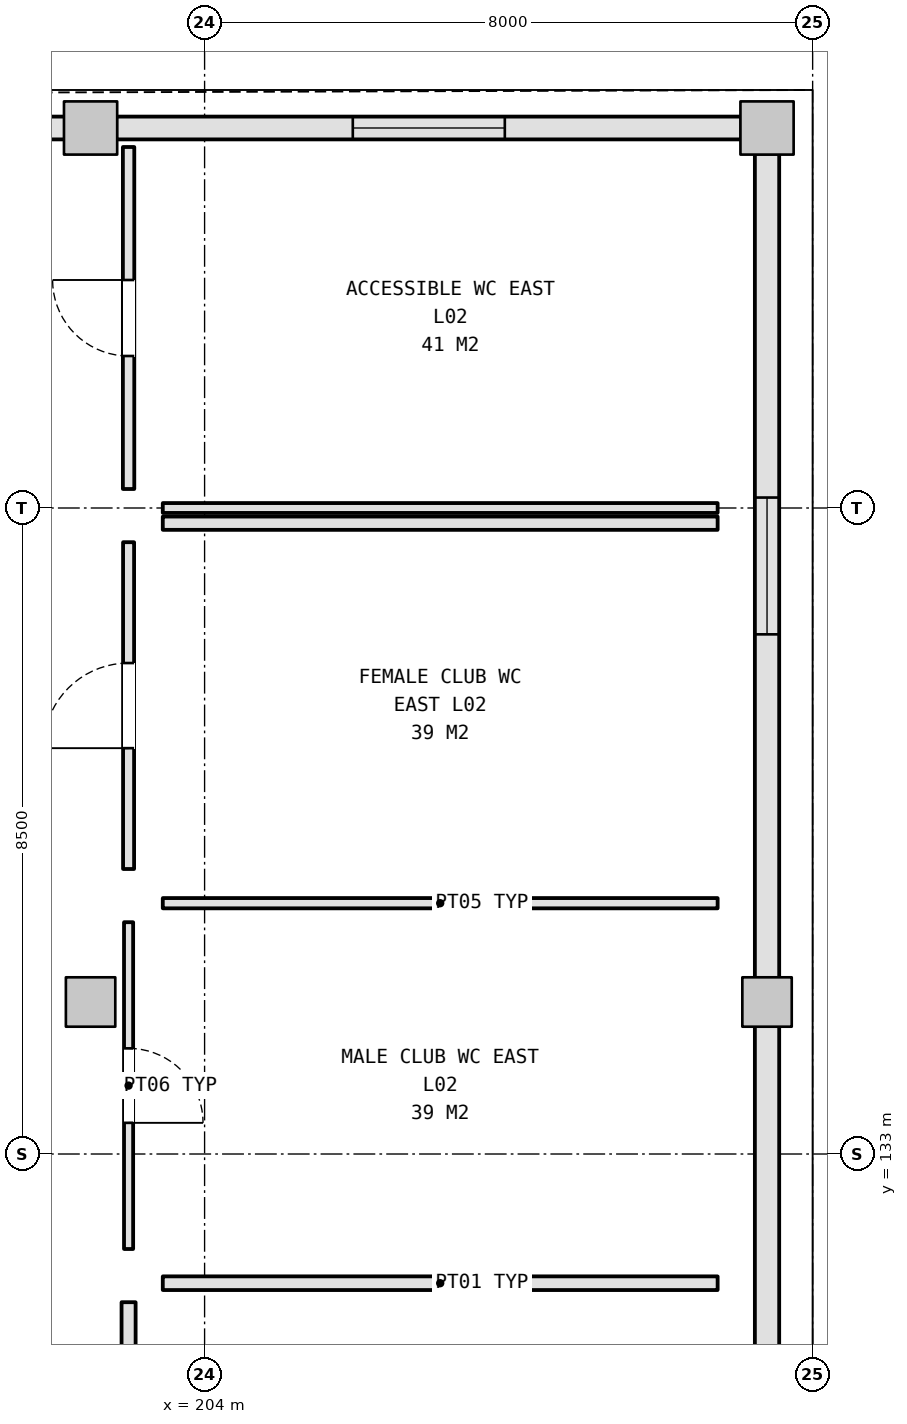
"""IFC4 building model, lengths in metres.
Left out: names, types, materials, properties, quantities, classifications, styles, units other than length and angle.
Written with IfcOpenShell. Run it as: python <this file> out.ifc"""

import sys

from ifc_helpers import new_model, si_unit, direction, frame, frame_2d, origin, origin_2d, place, context, subcontext, project, spatial, rectangle, extrude, element, fill, save


model = new_model("IFC4")
c1 = context("Model", 3, precision=1e-05, world=origin(), true_north=direction((0.0, 1.0)))
c2 = subcontext(c1, "Body", "Model", "MODEL_VIEW")
j1 = project(units=[si_unit("LENGTHUNIT", "METRE"), si_unit("PLANEANGLEUNIT", "RADIAN")], contexts=[c1])
p1 = place(None, origin())
s1 = spatial("IfcSite", under=j1, at=p1, CompositionType="ELEMENT")
p2 = place(p1, origin())
s2 = spatial("IfcBuilding", under=s1, at=p2, CompositionType="ELEMENT")
p3 = place(p2, frame((0.0, 0.0, 10.8)))
s3 = spatial("IfcBuildingStorey", under=s2, at=p3, CompositionType="ELEMENT", Elevation=10.8)
p4 = place(p3, frame((202.5, 135.0, 0.0), z_axis=(0.0, 0.0, 1.0), x_axis=(1.0, 0.0, 0.0)))
e1 = element("IfcColumn", 1, at=p4, inside=s3, PredefinedType="COLUMN", context=c2, shape_type="SweptSolid", body=[
    extrude(rectangle(XDim=0.65, YDim=0.65, at=origin_2d()), origin(), (0.0, 0.0, 1.0), 5.4),
])
p5 = place(p3, frame((202.5, 146.5, 0.0), z_axis=(0.0, 0.0, 1.0), x_axis=(1.0, 0.0, 0.0)))
e2 = element("IfcColumn", 2, at=p5, inside=s3, PredefinedType="COLUMN", context=c2, shape_type="SweptSolid", body=[
    extrude(rectangle(XDim=0.7, YDim=0.7, at=origin_2d()), origin(), (0.0, 0.0, 1.0), 5.4),
])
p6 = place(p3, frame((211.4, 135.0, 0.0), z_axis=(0.0, 0.0, 1.0), x_axis=(1.0, 0.0, 0.0)))
e3 = element("IfcColumn", 3, at=p6, inside=s3, PredefinedType="COLUMN", context=c2, shape_type="SweptSolid", body=[
    extrude(rectangle(XDim=0.65, YDim=0.65, at=origin_2d()), origin(), (0.0, 0.0, 1.0), 5.4),
])
p7 = place(p3, frame((211.4, 146.5, 0.0), z_axis=(0.0, 0.0, 1.0), x_axis=(1.0, 0.0, 0.0)))
e4 = element("IfcColumn", 4, at=p7, inside=s3, PredefinedType="COLUMN", context=c2, shape_type="SweptSolid", body=[
    extrude(rectangle(XDim=0.7, YDim=0.7, at=origin_2d()), origin(), (0.0, 0.0, 1.0), 5.4),
])
p8 = place(p3, frame((211.4, 123.838, 0.0), z_axis=(0.0, 0.0, 1.0), x_axis=(0.0, 1.0, 0.0)))
e5 = element("IfcWall", 5, at=p8, inside=s3, PredefinedType="SOLIDWALL", context=c2, shape_type="SweptSolid", body=[
    extrude(rectangle(XDim=10.849, YDim=0.32, at=frame_2d((5.425, 0.0))), origin(), (0.0, 0.0, 1.0), 4.455),
])
p9 = place(p8, frame((4.524, 0.0, 1.2)))
e6 = element("IfcOpeningElement", 6, at=p9, cuts=e5, PredefinedType="OPENING", context=c2, shape_type="SweptSolid", body=[
    extrude(rectangle(XDim=1.8, YDim=1.6, at=frame_2d((0.9, 0.8))), frame((0.0, 0.17, 0.0), z_axis=(0.0, -1.0, 0.0), x_axis=(1.0, 0.0, 0.0)), (0.0, 0.0, 1.0), 0.34),
])
p10 = place(p3, frame((211.4, 135.313, 0.0), z_axis=(0.0, 0.0, 1.0), x_axis=(0.0, 1.0, 0.0)))
e7 = element("IfcWall", 7, at=p10, inside=s3, PredefinedType="SOLIDWALL", context=c2, shape_type="SweptSolid", body=[
    extrude(rectangle(XDim=10.849, YDim=0.32, at=frame_2d((5.425, 0.0))), origin(), (0.0, 0.0, 1.0), 4.455),
])
p11 = place(p10, frame((4.524, 0.0, 1.2)))
e8 = element("IfcOpeningElement", 8, at=p11, cuts=e7, PredefinedType="OPENING", context=c2, shape_type="SweptSolid", body=[
    extrude(rectangle(XDim=1.8, YDim=1.6, at=frame_2d((0.9, 0.8))), frame((0.0, 0.17, 0.0), z_axis=(0.0, -1.0, 0.0), x_axis=(1.0, 0.0, 0.0)), (0.0, 0.0, 1.0), 0.34),
])
p12 = place(p3, frame((193.938, 146.5, 0.0), z_axis=(0.0, 0.0, 1.0), x_axis=(1.0, 0.0, 0.0)))
e9 = element("IfcWall", 9, at=p12, inside=s3, PredefinedType="SOLIDWALL", context=c2, shape_type="SweptSolid", body=[
    extrude(rectangle(XDim=8.224, YDim=0.3, at=frame_2d((4.112, 0.0))), origin(), (0.0, 0.0, 1.0), 4.455),
])
p13 = place(p12, frame((3.112, 0.0, 1.05)))
e10 = element("IfcOpeningElement", 10, at=p13, cuts=e9, PredefinedType="OPENING", context=c2, shape_type="SweptSolid", body=[
    extrude(rectangle(XDim=2.0, YDim=1.7, at=frame_2d((1.0, 0.85))), frame((0.0, 0.16, 0.0), z_axis=(0.0, -1.0, 0.0), x_axis=(1.0, 0.0, 0.0)), (0.0, 0.0, 1.0), 0.32),
])
p14 = place(p3, frame((202.838, 146.5, 0.0), z_axis=(0.0, 0.0, 1.0), x_axis=(1.0, 0.0, 0.0)))
e11 = element("IfcWall", 11, at=p14, inside=s3, PredefinedType="SOLIDWALL", context=c2, shape_type="SweptSolid", body=[
    extrude(rectangle(XDim=8.224, YDim=0.3, at=frame_2d((4.112, 0.0))), origin(), (0.0, 0.0, 1.0), 4.455),
])
p15 = place(p14, frame((3.112, 0.0, 1.05)))
e12 = element("IfcOpeningElement", 12, at=p15, cuts=e11, PredefinedType="OPENING", context=c2, shape_type="SweptSolid", body=[
    extrude(rectangle(XDim=2.0, YDim=1.7, at=frame_2d((1.0, 0.85))), frame((0.0, 0.16, 0.0), z_axis=(0.0, -1.0, 0.0), x_axis=(1.0, 0.0, 0.0)), (0.0, 0.0, 1.0), 0.32),
])
p16 = place(p3, frame((203.0, 117.75, 0.0), z_axis=(0.0, 0.0, 1.0), x_axis=(0.0, 1.0, 0.0)))
e13 = element("IfcWall", 13, at=p16, inside=s3, PredefinedType="PARTITIONING", context=c2, shape_type="SweptSolid", body=[
    extrude(rectangle(XDim=13.3, YDim=0.185, at=frame_2d((6.65, 0.0))), origin(), (0.0, 0.0, 1.0), 4.605),
])
p17 = place(p16, frame((6.5, 0.0, 0.0)))
e14 = element("IfcOpeningElement", 14, at=p17, cuts=e13, PredefinedType="OPENING", context=c2, shape_type="SweptSolid", body=[
    extrude(rectangle(XDim=1.1, YDim=2.15, at=frame_2d((0.55, 1.075))), frame((0.0, 0.103, 0.0), z_axis=(0.0, -1.0, 0.0), x_axis=(1.0, 0.0, 0.0)), (0.0, 0.0, 1.0), 0.205),
])
p18 = place(p3, frame((203.45, 131.3, 0.0), z_axis=(0.0, 0.0, 1.0), x_axis=(1.0, 0.0, 0.0)))
e15 = element("IfcWall", 15, at=p18, inside=s3, PredefinedType="PARTITIONING", context=c2, shape_type="SweptSolid", body=[
    extrude(rectangle(XDim=7.3, YDim=0.18, at=frame_2d((3.65, 0.0))), origin(), (0.0, 0.0, 1.0), 5.12),
])
p19 = place(p3, frame((203.0, 131.75, 0.0), z_axis=(0.0, 0.0, 1.0), x_axis=(0.0, 1.0, 0.0)))
e16 = element("IfcWall", 16, at=p19, inside=s3, PredefinedType="PARTITIONING", context=c2, shape_type="SweptSolid", body=[
    extrude(rectangle(XDim=4.3, YDim=0.12, at=frame_2d((2.15, 0.0))), origin(), (0.0, 0.0, 1.0), 4.695),
])
p20 = place(p19, frame((1.66, 0.0, 0.0)))
e17 = element("IfcOpeningElement", 17, at=p20, cuts=e16, PredefinedType="OPENING", context=c2, shape_type="SweptSolid", body=[
    extrude(rectangle(XDim=0.98, YDim=2.15, at=frame_2d((0.49, 1.075))), frame((0.0, 0.07, 0.0), z_axis=(0.0, -1.0, 0.0), x_axis=(1.0, 0.0, 0.0)), (0.0, 0.0, 1.0), 0.14),
])
p21 = place(p3, frame((203.45, 136.3, 0.0), z_axis=(0.0, 0.0, 1.0), x_axis=(1.0, 0.0, 0.0)))
e18 = element("IfcWall", 18, at=p21, inside=s3, PredefinedType="PARTITIONING", context=c2, shape_type="SweptSolid", body=[
    extrude(rectangle(XDim=7.3, YDim=0.135, at=frame_2d((3.65, 0.0))), origin(), (0.0, 0.0, 1.0), 5.12),
])
p22 = place(p3, frame((203.0, 136.75, 0.0), z_axis=(0.0, 0.0, 1.0), x_axis=(0.0, 1.0, 0.0)))
e19 = element("IfcWall", 19, at=p22, inside=s3, PredefinedType="PARTITIONING", context=c2, shape_type="SweptSolid", body=[
    extrude(rectangle(XDim=4.3, YDim=0.145, at=frame_2d((2.15, 0.0))), origin(), (0.0, 0.0, 1.0), 4.605),
])
p23 = place(p22, frame((1.59, 0.0, 0.0)))
e20 = element("IfcOpeningElement", 20, at=p23, cuts=e19, PredefinedType="OPENING", context=c2, shape_type="SweptSolid", body=[
    extrude(rectangle(XDim=1.12, YDim=2.2, at=frame_2d((0.56, 1.1))), frame((0.0, 0.083, 0.0), z_axis=(0.0, -1.0, 0.0), x_axis=(1.0, 0.0, 0.0)), (0.0, 0.0, 1.0), 0.165),
])
p24 = place(p3, frame((203.45, 141.3, 0.0), z_axis=(0.0, 0.0, 1.0), x_axis=(1.0, 0.0, 0.0)))
e21 = element("IfcWall", 21, at=p24, inside=s3, PredefinedType="PARTITIONING", context=c2, shape_type="SweptSolid", body=[
    extrude(rectangle(XDim=7.3, YDim=0.175, at=frame_2d((3.65, 0.0))), origin(), (0.0, 0.0, 1.0), 5.12),
])
p25 = place(p3, frame((203.0, 141.75, 0.0), z_axis=(0.0, 0.0, 1.0), x_axis=(0.0, 1.0, 0.0)))
e22 = element("IfcWall", 22, at=p25, inside=s3, PredefinedType="PARTITIONING", context=c2, shape_type="SweptSolid", body=[
    extrude(rectangle(XDim=4.5, YDim=0.15, at=frame_2d((2.25, 0.0))), origin(), (0.0, 0.0, 1.0), 5.12),
])
p26 = place(p25, frame((1.75, 0.0, 0.0)))
e23 = element("IfcOpeningElement", 23, at=p26, cuts=e22, PredefinedType="OPENING", context=c2, shape_type="SweptSolid", body=[
    extrude(rectangle(XDim=1.0, YDim=2.1, at=frame_2d((0.5, 1.05))), frame((0.0, 0.085, 0.0), z_axis=(0.0, -1.0, 0.0), x_axis=(1.0, 0.0, 0.0)), (0.0, 0.0, 1.0), 0.17),
])
p27 = place(p3, frame((210.75, 141.5, 0.0), z_axis=(0.0, 0.0, 1.0), x_axis=(-1.0, 0.0, 0.0)))
e24 = element("IfcWall", 24, at=p27, inside=s3, PredefinedType="PARTITIONING", context=c2, shape_type="SweptSolid", body=[
    extrude(rectangle(XDim=7.3, YDim=0.13, at=frame_2d((3.65, 0.0))), origin(), (0.0, 0.0, 1.0), 5.12),
])
p28 = place(p11, origin())
e25 = element("IfcWindow", 25, at=p28, inside=s3, PartitioningType="SINGLE_PANEL", PredefinedType="WINDOW", context=c2, shape_type="SweptSolid", body=[
    extrude(rectangle(XDim=1.8, YDim=1.6, at=frame_2d((0.9, 0.8))), frame((0.0, 0.03, 0.0), z_axis=(0.0, -1.0, 0.0), x_axis=(1.0, 0.0, 0.0)), (0.0, 0.0, 1.0), 0.06),
])
fill(e8, e25)
p29 = place(p15, origin())
e26 = element("IfcWindow", 26, at=p29, inside=s3, PartitioningType="SINGLE_PANEL", PredefinedType="WINDOW", context=c2, shape_type="SweptSolid", body=[
    extrude(rectangle(XDim=2.0, YDim=1.7, at=frame_2d((1.0, 0.85))), frame((0.0, 0.03, 0.0), z_axis=(0.0, -1.0, 0.0), x_axis=(1.0, 0.0, 0.0)), (0.0, 0.0, 1.0), 0.06),
])
fill(e12, e26)
p30 = place(p20, frame((0.98, 0.0, 0.0), z_axis=(0.0, 0.0, 1.0), x_axis=(-1.0, 0.0, 0.0)))
e27 = element("IfcDoor", 27, at=p30, inside=s3, OperationType="SINGLE_SWING_LEFT", PredefinedType="DOOR", context=c2, shape_type="SweptSolid", body=[
    extrude(rectangle(XDim=0.98, YDim=2.15, at=frame_2d((0.49, 1.075))), frame((0.0, 0.025, 0.0), z_axis=(0.0, -1.0, 0.0), x_axis=(1.0, 0.0, 0.0)), (0.0, 0.0, 1.0), 0.05),
])
fill(e17, e27)
p31 = place(p23, origin())
e28 = element("IfcDoor", 28, at=p31, inside=s3, OperationType="SINGLE_SWING_LEFT", PredefinedType="DOOR", context=c2, shape_type="SweptSolid", body=[
    extrude(rectangle(XDim=1.12, YDim=2.2, at=frame_2d((0.56, 1.1))), frame((0.0, 0.025, 0.0), z_axis=(0.0, -1.0, 0.0), x_axis=(1.0, 0.0, 0.0)), (0.0, 0.0, 1.0), 0.05),
])
fill(e20, e28)
p32 = place(p26, origin())
e29 = element("IfcDoor", 29, at=p32, inside=s3, OperationType="SINGLE_SWING_RIGHT", PredefinedType="DOOR", context=c2, shape_type="SweptSolid", body=[
    extrude(rectangle(XDim=1.0, YDim=2.1, at=frame_2d((0.5, 1.05))), frame((0.0, 0.025, 0.0), z_axis=(0.0, -1.0, 0.0), x_axis=(1.0, 0.0, 0.0)), (0.0, 0.0, 1.0), 0.05),
])
fill(e23, e29)
save(model, sys.argv[1])
